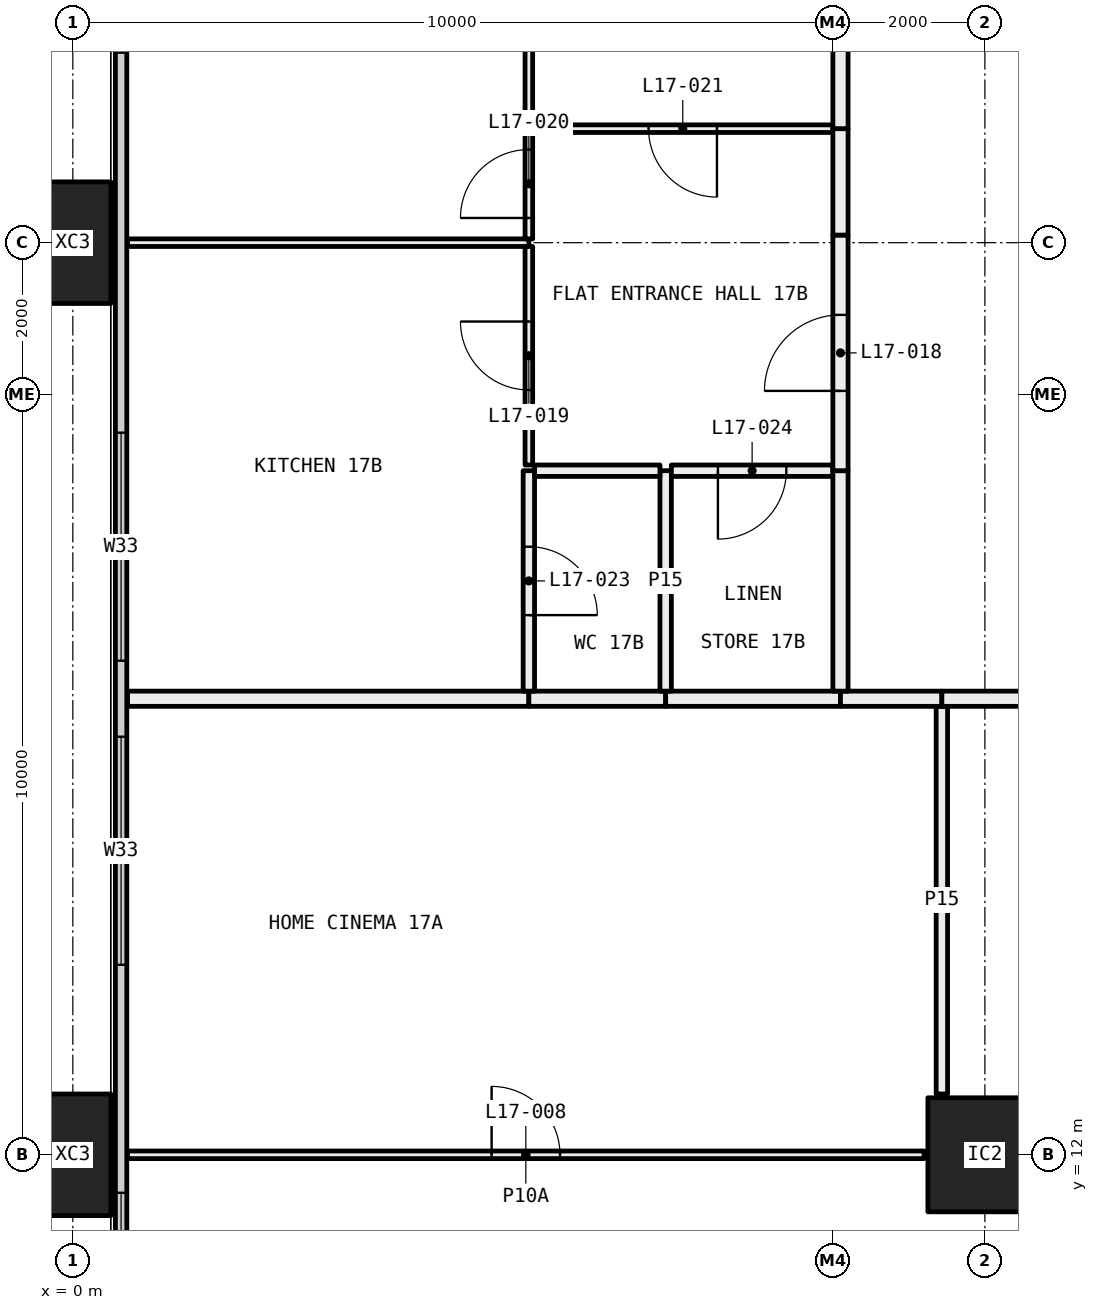
"""IFC4 building model, lengths in metres.
Left out: names, types, materials, properties, quantities, classifications, styles, units other than length and angle.
Written with IfcOpenShell. Run it as: python <this file> out.ifc"""

import sys

from ifc_helpers import new_model, si_unit, direction, frame, frame_2d, origin, origin_2d, place, context, subcontext, project, spatial, rectangle, hollow_rectangle, extrude, element, fill, save


model = new_model("IFC4")
c1 = context("Model", 3, precision=1e-05, world=origin(), true_north=direction((0.0, 1.0)))
c2 = subcontext(c1, "Body", "Model", "MODEL_VIEW")
j1 = project(units=[si_unit("LENGTHUNIT", "METRE"), si_unit("PLANEANGLEUNIT", "RADIAN")], contexts=[c1])
p1 = place(None, origin())
s1 = spatial("IfcSite", under=j1, at=p1, CompositionType="ELEMENT")
p2 = place(p1, origin())
s2 = spatial("IfcBuilding", under=s1, at=p2, CompositionType="ELEMENT")
p3 = place(p2, frame((0.0, 0.0, 71.4)))
s3 = spatial("IfcBuildingStorey", under=s2, at=p3, CompositionType="ELEMENT", Elevation=71.4)
for number, where, z_axis, x_axis in (
    (1, (0.0, 12.0, -0.4), (0.0, 0.0, 1.0), (0.0, 1.0, 0.0)),
    (2, (0.0, 24.0, -0.4), (0.0, 0.0, 1.0), (0.0, 1.0, 0.0)),
):
    element("IfcColumn", number, at=place(p3, frame(where, z_axis=z_axis, x_axis=x_axis)), inside=s3, PredefinedType="COLUMN", context=c2, shape_type="SweptSolid", body=[
        extrude(hollow_rectangle(XDim=1.6, YDim=1.0, WallThickness=0.065, at=origin_2d()), origin(), (0.0, 0.0, 1.0), 3.45),
    ])
p4 = place(p3, frame((12.0, 12.0, 0.0), z_axis=(0.0, 0.0, 1.0), x_axis=(1.0, 0.0, 0.0)))
e3 = element("IfcColumn", 3, at=p4, inside=s3, PredefinedType="COLUMN", context=c2, shape_type="SweptSolid", body=[
    extrude(hollow_rectangle(XDim=1.5, YDim=1.5, WallThickness=0.065, at=origin_2d()), origin(), (0.0, 0.0, 1.0), 3.05),
])
p5 = place(p3, frame((0.635, 6.71, 0.0), z_axis=(0.0, 0.0, 1.0), x_axis=(0.0, 1.0, 0.0)))
e4 = element("IfcWall", 4, at=p5, inside=s3, PredefinedType="ELEMENTEDWALL", context=c2, shape_type="SweptSolid", body=[
    extrude(rectangle(XDim=34.58, YDim=0.15, at=frame_2d((17.29, 0.0))), origin(), (0.0, 0.0, 1.0), 3.05),
])
p6 = place(p5, frame((0.29, 0.0, 0.45)))
e5 = element("IfcOpeningElement", 5, at=p6, cuts=e4, PredefinedType="OPENING", context=c2, shape_type="SweptSolid", body=[
    extrude(rectangle(XDim=4.5, YDim=2.55, at=frame_2d((2.25, 1.275))), frame((0.0, 0.085, 0.0), z_axis=(0.0, -1.0, 0.0), x_axis=(1.0, 0.0, 0.0)), (0.0, 0.0, 1.0), 0.17),
])
p7 = place(p5, frame((7.79, 0.0, 0.45)))
e6 = element("IfcOpeningElement", 6, at=p7, cuts=e4, PredefinedType="OPENING", context=c2, shape_type="SweptSolid", body=[
    extrude(rectangle(XDim=3.0, YDim=2.55, at=frame_2d((1.5, 1.275))), frame((0.0, 0.085, 0.0), z_axis=(0.0, -1.0, 0.0), x_axis=(1.0, 0.0, 0.0)), (0.0, 0.0, 1.0), 0.17),
])
p8 = place(p5, frame((11.79, 0.0, 0.45)))
e7 = element("IfcOpeningElement", 7, at=p8, cuts=e4, PredefinedType="OPENING", context=c2, shape_type="SweptSolid", body=[
    extrude(rectangle(XDim=3.0, YDim=2.55, at=frame_2d((1.5, 1.275))), frame((0.0, 0.085, 0.0), z_axis=(0.0, -1.0, 0.0), x_axis=(1.0, 0.0, 0.0)), (0.0, 0.0, 1.0), 0.17),
])
p9 = place(p5, frame((19.79, 0.0, 0.45)))
e8 = element("IfcOpeningElement", 8, at=p9, cuts=e4, PredefinedType="OPENING", context=c2, shape_type="SweptSolid", body=[
    extrude(rectangle(XDim=3.0, YDim=2.55, at=frame_2d((1.5, 1.275))), frame((0.0, 0.085, 0.0), z_axis=(0.0, -1.0, 0.0), x_axis=(1.0, 0.0, 0.0)), (0.0, 0.0, 1.0), 0.17),
])
p10 = place(p5, frame((23.79, 0.0, 0.45)))
e9 = element("IfcOpeningElement", 9, at=p10, cuts=e4, PredefinedType="OPENING", context=c2, shape_type="SweptSolid", body=[
    extrude(rectangle(XDim=2.0, YDim=2.55, at=frame_2d((1.0, 1.275))), frame((0.0, 0.085, 0.0), z_axis=(0.0, -1.0, 0.0), x_axis=(1.0, 0.0, 0.0)), (0.0, 0.0, 1.0), 0.17),
])
p11 = place(p5, frame((29.79, 0.0, 0.45)))
e10 = element("IfcOpeningElement", 10, at=p11, cuts=e4, PredefinedType="OPENING", context=c2, shape_type="SweptSolid", body=[
    extrude(rectangle(XDim=4.5, YDim=2.55, at=frame_2d((2.25, 1.275))), frame((0.0, 0.085, 0.0), z_axis=(0.0, -1.0, 0.0), x_axis=(1.0, 0.0, 0.0)), (0.0, 0.0, 1.0), 0.17),
])
p12 = place(p3, frame((11.2, 12.0, 0.0), z_axis=(0.0, 0.0, 1.0), x_axis=(-1.0, 0.0, 0.0)))
e11 = element("IfcWall", 11, at=p12, inside=s3, PredefinedType="PARTITIONING", context=c2, shape_type="SweptSolid", body=[
    extrude(rectangle(XDim=10.48, YDim=0.1, at=frame_2d((5.24, 0.0))), origin(), (0.0, 0.0, 1.0), 2.45),
])
p13 = place(p12, frame((4.79, 0.0, 0.0)))
e12 = element("IfcOpeningElement", 12, at=p13, cuts=e11, PredefinedType="OPENING", context=c2, shape_type="SweptSolid", body=[
    extrude(rectangle(XDim=0.9, YDim=2.1, at=frame_2d((0.45, 1.05))), frame((0.0, 0.06, 0.0), z_axis=(0.0, -1.0, 0.0), x_axis=(1.0, 0.0, 0.0)), (0.0, 0.0, 1.0), 0.12),
])
p14 = place(p3, frame((11.434, 12.8, 0.0), z_axis=(0.0, 0.0, 1.0), x_axis=(0.0, 1.0, 0.0)))
e13 = element("IfcWall", 13, at=p14, inside=s3, PredefinedType="PARTITIONING", context=c2, shape_type="SweptSolid", body=[
    extrude(rectangle(XDim=5.1, YDim=0.15, at=frame_2d((2.55, 0.0))), origin(), (0.0, 0.0, 1.0), 3.05),
])
p15 = place(p3, frame((6.0, 18.0, 0.0), z_axis=(0.0, 0.0, 1.0), x_axis=(-1.0, 0.0, 0.0)))
e14 = element("IfcWall", 14, at=p15, inside=s3, PredefinedType="PARTITIONING", context=c2, shape_type="SweptSolid", body=[
    extrude(rectangle(XDim=5.28, YDim=0.2, at=frame_2d((2.64, 0.0))), origin(), (0.0, 0.0, 1.0), 3.05),
])
p16 = place(p3, frame((7.8, 18.0, 0.0), z_axis=(0.0, 0.0, 1.0), x_axis=(-1.0, 0.0, 0.0)))
e15 = element("IfcWall", 15, at=p16, inside=s3, PredefinedType="PARTITIONING", context=c2, shape_type="SweptSolid", body=[
    extrude(rectangle(XDim=1.8, YDim=0.2, at=frame_2d((0.9, 0.0))), origin(), (0.0, 0.0, 1.0), 3.05),
])
p17 = place(p3, frame((10.1, 18.0, 0.0), z_axis=(0.0, 0.0, 1.0), x_axis=(-1.0, 0.0, 0.0)))
e16 = element("IfcWall", 16, at=p17, inside=s3, PredefinedType="PARTITIONING", context=c2, shape_type="SweptSolid", body=[
    extrude(rectangle(XDim=2.3, YDim=0.2, at=frame_2d((1.15, 0.0))), origin(), (0.0, 0.0, 1.0), 3.05),
])
p18 = place(p3, frame((11.434, 18.0, 0.0), z_axis=(0.0, 0.0, 1.0), x_axis=(-1.0, 0.0, 0.0)))
e17 = element("IfcWall", 17, at=p18, inside=s3, PredefinedType="PARTITIONING", context=c2, shape_type="SweptSolid", body=[
    extrude(rectangle(XDim=1.334, YDim=0.2, at=frame_2d((0.667, 0.0))), origin(), (0.0, 0.0, 1.0), 3.05),
])
p19 = place(p3, frame((18.0, 18.0, 0.0), z_axis=(0.0, 0.0, 1.0), x_axis=(-1.0, 0.0, 0.0)))
e18 = element("IfcWall", 18, at=p19, inside=s3, PredefinedType="PARTITIONING", context=c2, shape_type="SweptSolid", body=[
    extrude(rectangle(XDim=6.566, YDim=0.2, at=frame_2d((3.283, 0.0))), origin(), (0.0, 0.0, 1.0), 3.05),
])
p20 = place(p3, frame((6.0, 24.0, 0.0), z_axis=(0.0, 0.0, 1.0), x_axis=(-1.0, 0.0, 0.0)))
e19 = element("IfcWall", 19, at=p20, inside=s3, PredefinedType="PARTITIONING", context=c2, shape_type="SweptSolid", body=[
    extrude(rectangle(XDim=5.28, YDim=0.1, at=frame_2d((2.64, 0.0))), origin(), (0.0, 0.0, 1.0), 2.45),
])
p21 = place(p3, frame((6.0, 18.1, 0.0), z_axis=(0.0, 0.0, 1.0), x_axis=(0.0, 1.0, 0.0)))
e20 = element("IfcWall", 20, at=p21, inside=s3, PredefinedType="PARTITIONING", context=c2, shape_type="SweptSolid", body=[
    extrude(rectangle(XDim=2.9, YDim=0.15, at=frame_2d((1.45, 0.0))), origin(), (0.0, 0.0, 1.0), 3.05),
])
p22 = place(p21, frame((1.0, 0.0, 0.0)))
e21 = element("IfcOpeningElement", 21, at=p22, cuts=e20, PredefinedType="OPENING", context=c2, shape_type="SweptSolid", body=[
    extrude(rectangle(XDim=0.9, YDim=2.1, at=frame_2d((0.45, 1.05))), frame((0.0, 0.085, 0.0), z_axis=(0.0, -1.0, 0.0), x_axis=(1.0, 0.0, 0.0)), (0.0, 0.0, 1.0), 0.17),
])
p23 = place(p3, frame((6.0, 21.075, 0.0), z_axis=(0.0, 0.0, 1.0), x_axis=(0.0, 1.0, 0.0)))
e22 = element("IfcWall", 22, at=p23, inside=s3, PredefinedType="PARTITIONING", context=c2, shape_type="SweptSolid", body=[
    extrude(rectangle(XDim=2.875, YDim=0.1, at=frame_2d((1.438, 0.0))), origin(), (0.0, 0.0, 1.0), 2.45),
])
p24 = place(p23, frame((0.988, 0.0, 0.0)))
e23 = element("IfcOpeningElement", 23, at=p24, cuts=e22, PredefinedType="OPENING", context=c2, shape_type="SweptSolid", body=[
    extrude(rectangle(XDim=0.9, YDim=2.1, at=frame_2d((0.45, 1.05))), frame((0.0, 0.06, 0.0), z_axis=(0.0, -1.0, 0.0), x_axis=(1.0, 0.0, 0.0)), (0.0, 0.0, 1.0), 0.12),
])
p25 = place(p3, frame((6.0, 24.05, 0.0), z_axis=(0.0, 0.0, 1.0), x_axis=(0.0, 1.0, 0.0)))
e24 = element("IfcWall", 24, at=p25, inside=s3, PredefinedType="PARTITIONING", context=c2, shape_type="SweptSolid", body=[
    extrude(rectangle(XDim=1.45, YDim=0.1, at=frame_2d((0.725, 0.0))), origin(), (0.0, 0.0, 1.0), 2.45),
])
p26 = place(p25, frame((0.275, 0.0, 0.0)))
e25 = element("IfcOpeningElement", 25, at=p26, cuts=e24, PredefinedType="OPENING", context=c2, shape_type="SweptSolid", body=[
    extrude(rectangle(XDim=0.9, YDim=2.1, at=frame_2d((0.45, 1.05))), frame((0.0, 0.06, 0.0), z_axis=(0.0, -1.0, 0.0), x_axis=(1.0, 0.0, 0.0)), (0.0, 0.0, 1.0), 0.12),
])
p27 = place(p3, frame((6.0, 25.5, 0.0), z_axis=(0.0, 0.0, 1.0), x_axis=(0.0, 1.0, 0.0)))
e26 = element("IfcWall", 26, at=p27, inside=s3, PredefinedType="PARTITIONING", context=c2, shape_type="SweptSolid", body=[
    extrude(rectangle(XDim=10.45, YDim=0.1, at=frame_2d((5.225, 0.0))), origin(), (0.0, 0.0, 1.0), 2.45),
])
p28 = place(p3, frame((7.8, 18.1, 0.0), z_axis=(0.0, 0.0, 1.0), x_axis=(0.0, 1.0, 0.0)))
e27 = element("IfcWall", 27, at=p28, inside=s3, PredefinedType="PARTITIONING", context=c2, shape_type="SweptSolid", body=[
    extrude(rectangle(XDim=2.9, YDim=0.15, at=frame_2d((1.45, 0.0))), origin(), (0.0, 0.0, 1.0), 3.05),
])
p29 = place(p3, frame((7.725, 21.0, 0.0), z_axis=(0.0, 0.0, 1.0), x_axis=(-1.0, 0.0, 0.0)))
e28 = element("IfcWall", 28, at=p29, inside=s3, PredefinedType="PARTITIONING", context=c2, shape_type="SweptSolid", body=[
    extrude(rectangle(XDim=1.65, YDim=0.15, at=frame_2d((0.825, 0.0))), origin(), (0.0, 0.0, 1.0), 3.05),
])
p30 = place(p3, frame((10.0, 21.0, 0.0), z_axis=(0.0, 0.0, 1.0), x_axis=(-1.0, 0.0, 0.0)))
e29 = element("IfcWall", 29, at=p30, inside=s3, PredefinedType="PARTITIONING", context=c2, shape_type="SweptSolid", body=[
    extrude(rectangle(XDim=2.125, YDim=0.15, at=frame_2d((1.062, 0.0))), origin(), (0.0, 0.0, 1.0), 3.05),
])
p31 = place(p30, frame((0.613, 0.0, 0.0)))
e30 = element("IfcOpeningElement", 30, at=p31, cuts=e29, PredefinedType="OPENING", context=c2, shape_type="SweptSolid", body=[
    extrude(rectangle(XDim=0.9, YDim=2.1, at=frame_2d((0.45, 1.05))), frame((0.0, 0.085, 0.0), z_axis=(0.0, -1.0, 0.0), x_axis=(1.0, 0.0, 0.0)), (0.0, 0.0, 1.0), 0.17),
])
p32 = place(p3, frame((10.1, 18.1, 0.0), z_axis=(0.0, 0.0, 1.0), x_axis=(0.0, 1.0, 0.0)))
e31 = element("IfcWall", 31, at=p32, inside=s3, PredefinedType="PARTITIONING", context=c2, shape_type="SweptSolid", body=[
    extrude(rectangle(XDim=2.9, YDim=0.2, at=frame_2d((1.45, 0.0))), origin(), (0.0, 0.0, 1.0), 3.05),
])
p33 = place(p3, frame((10.0, 25.5, 0.0), z_axis=(0.0, 0.0, 1.0), x_axis=(-1.0, 0.0, 0.0)))
e32 = element("IfcWall", 32, at=p33, inside=s3, PredefinedType="PARTITIONING", context=c2, shape_type="SweptSolid", body=[
    extrude(rectangle(XDim=3.95, YDim=0.1, at=frame_2d((1.975, 0.0))), origin(), (0.0, 0.0, 1.0), 3.05),
])
p34 = place(p33, frame((1.525, 0.0, 0.0)))
e33 = element("IfcOpeningElement", 33, at=p34, cuts=e32, PredefinedType="OPENING", context=c2, shape_type="SweptSolid", body=[
    extrude(rectangle(XDim=0.9, YDim=2.1, at=frame_2d((0.45, 1.05))), frame((0.0, 0.06, 0.0), z_axis=(0.0, -1.0, 0.0), x_axis=(1.0, 0.0, 0.0)), (0.0, 0.0, 1.0), 0.12),
])
p35 = place(p3, frame((10.1, 21.0, 0.0), z_axis=(0.0, 0.0, 1.0), x_axis=(0.0, 1.0, 0.0)))
e34 = element("IfcWall", 34, at=p35, inside=s3, PredefinedType="PARTITIONING", context=c2, shape_type="SweptSolid", body=[
    extrude(rectangle(XDim=3.1, YDim=0.2, at=frame_2d((1.55, 0.0))), origin(), (0.0, 0.0, 1.0), 2.45),
])
p36 = place(p35, frame((1.05, 0.0, 0.0)))
e35 = element("IfcOpeningElement", 35, at=p36, cuts=e34, PredefinedType="OPENING", context=c2, shape_type="SweptSolid", body=[
    extrude(rectangle(XDim=1.0, YDim=2.1, at=frame_2d((0.5, 1.05))), frame((0.0, 0.11, 0.0), z_axis=(0.0, -1.0, 0.0), x_axis=(1.0, 0.0, 0.0)), (0.0, 0.0, 1.0), 0.22),
])
p37 = place(p3, frame((10.1, 24.1, 0.0), z_axis=(0.0, 0.0, 1.0), x_axis=(0.0, 1.0, 0.0)))
e36 = element("IfcWall", 36, at=p37, inside=s3, PredefinedType="PARTITIONING", context=c2, shape_type="SweptSolid", body=[
    extrude(rectangle(XDim=1.4, YDim=0.2, at=frame_2d((0.7, 0.0))), origin(), (0.0, 0.0, 1.0), 3.05),
])
p38 = place(p3, frame((10.1, 25.5, 0.0), z_axis=(0.0, 0.0, 1.0), x_axis=(0.0, 1.0, 0.0)))
e37 = element("IfcWall", 37, at=p38, inside=s3, PredefinedType="PARTITIONING", context=c2, shape_type="SweptSolid", body=[
    extrude(rectangle(XDim=10.6, YDim=0.2, at=frame_2d((5.3, 0.0))), origin(), (0.0, 0.0, 1.0), 2.45),
])
p39 = place(p6, origin())
e38 = element("IfcWindow", 38, at=p39, inside=s3, PartitioningType="SINGLE_PANEL", PredefinedType="WINDOW", context=c2, shape_type="SweptSolid", body=[
    extrude(rectangle(XDim=4.5, YDim=2.55, at=frame_2d((2.25, 1.275))), frame((0.0, 0.03, 0.0), z_axis=(0.0, -1.0, 0.0), x_axis=(1.0, 0.0, 0.0)), (0.0, 0.0, 1.0), 0.06),
])
fill(e5, e38)
p40 = place(p7, origin())
e39 = element("IfcWindow", 39, at=p40, inside=s3, PartitioningType="SINGLE_PANEL", PredefinedType="WINDOW", context=c2, shape_type="SweptSolid", body=[
    extrude(rectangle(XDim=3.0, YDim=2.55, at=frame_2d((1.5, 1.275))), frame((0.0, 0.03, 0.0), z_axis=(0.0, -1.0, 0.0), x_axis=(1.0, 0.0, 0.0)), (0.0, 0.0, 1.0), 0.06),
])
fill(e6, e39)
p41 = place(p8, origin())
e40 = element("IfcWindow", 40, at=p41, inside=s3, PartitioningType="SINGLE_PANEL", PredefinedType="WINDOW", context=c2, shape_type="SweptSolid", body=[
    extrude(rectangle(XDim=3.0, YDim=2.55, at=frame_2d((1.5, 1.275))), frame((0.0, 0.03, 0.0), z_axis=(0.0, -1.0, 0.0), x_axis=(1.0, 0.0, 0.0)), (0.0, 0.0, 1.0), 0.06),
])
fill(e7, e40)
p42 = place(p13, frame((0.9, 0.0, 0.0), x_axis=(-1.0, 0.0, 0.0)))
e41 = element("IfcDoor", 41, at=p42, inside=s3, OperationType="SINGLE_SWING_RIGHT", PredefinedType="DOOR", context=c2, shape_type="SweptSolid", body=[
    extrude(rectangle(XDim=0.9, YDim=2.1, at=frame_2d((0.45, 1.05))), frame((0.0, 0.025, 0.0), z_axis=(0.0, -1.0, 0.0), x_axis=(1.0, 0.0, 0.0)), (0.0, 0.0, 1.0), 0.05),
])
fill(e12, e41)
p43 = place(p36, origin())
e42 = element("IfcDoor", 42, at=p43, inside=s3, OperationType="SINGLE_SWING_RIGHT", PredefinedType="DOOR", context=c2, shape_type="SweptSolid", body=[
    extrude(rectangle(XDim=1.0, YDim=2.1, at=frame_2d((0.5, 1.05))), frame((0.0, 0.025, 0.0), z_axis=(0.0, -1.0, 0.0), x_axis=(1.0, 0.0, 0.0)), (0.0, 0.0, 1.0), 0.05),
])
fill(e35, e42)
p44 = place(p24, origin())
e43 = element("IfcDoor", 43, at=p44, inside=s3, OperationType="SINGLE_SWING_LEFT", PredefinedType="DOOR", context=c2, shape_type="SweptSolid", body=[
    extrude(rectangle(XDim=0.9, YDim=2.1, at=frame_2d((0.45, 1.05))), frame((0.0, 0.025, 0.0), z_axis=(0.0, -1.0, 0.0), x_axis=(1.0, 0.0, 0.0)), (0.0, 0.0, 1.0), 0.05),
])
fill(e23, e43)
p45 = place(p26, origin())
e44 = element("IfcDoor", 44, at=p45, inside=s3, OperationType="SINGLE_SWING_RIGHT", PredefinedType="DOOR", context=c2, shape_type="SweptSolid", body=[
    extrude(rectangle(XDim=0.9, YDim=2.1, at=frame_2d((0.45, 1.05))), frame((0.0, 0.025, 0.0), z_axis=(0.0, -1.0, 0.0), x_axis=(1.0, 0.0, 0.0)), (0.0, 0.0, 1.0), 0.05),
])
fill(e25, e44)
p46 = place(p34, origin())
e45 = element("IfcDoor", 45, at=p46, inside=s3, OperationType="SINGLE_SWING_RIGHT", PredefinedType="DOOR", context=c2, shape_type="SweptSolid", body=[
    extrude(rectangle(XDim=0.9, YDim=2.1, at=frame_2d((0.45, 1.05))), frame((0.0, 0.025, 0.0), z_axis=(0.0, -1.0, 0.0), x_axis=(1.0, 0.0, 0.0)), (0.0, 0.0, 1.0), 0.05),
])
fill(e33, e45)
p47 = place(p22, frame((0.9, 0.0, 0.0), x_axis=(-1.0, 0.0, 0.0)))
e46 = element("IfcDoor", 46, at=p47, inside=s3, OperationType="SINGLE_SWING_LEFT", PredefinedType="DOOR", context=c2, shape_type="SweptSolid", body=[
    extrude(rectangle(XDim=0.9, YDim=2.1, at=frame_2d((0.45, 1.05))), frame((0.0, 0.025, 0.0), z_axis=(0.0, -1.0, 0.0), x_axis=(1.0, 0.0, 0.0)), (0.0, 0.0, 1.0), 0.05),
])
fill(e21, e46)
p48 = place(p31, origin())
e47 = element("IfcDoor", 47, at=p48, inside=s3, OperationType="SINGLE_SWING_LEFT", PredefinedType="DOOR", context=c2, shape_type="SweptSolid", body=[
    extrude(rectangle(XDim=0.9, YDim=2.1, at=frame_2d((0.45, 1.05))), frame((0.0, 0.025, 0.0), z_axis=(0.0, -1.0, 0.0), x_axis=(1.0, 0.0, 0.0)), (0.0, 0.0, 1.0), 0.05),
])
fill(e30, e47)
save(model, sys.argv[1])
